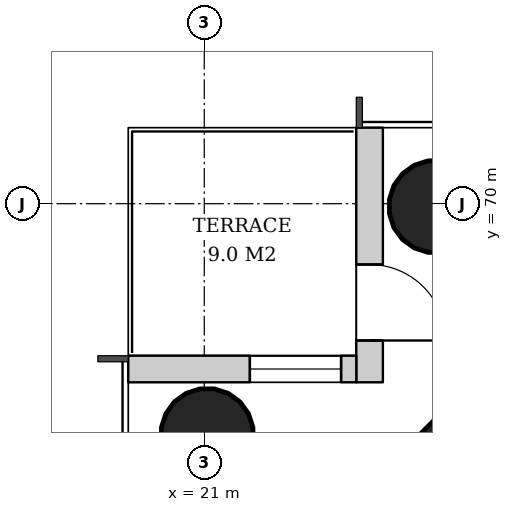
"""IFC4 building model, lengths in metres.
Left out: names, types, materials, properties, quantities, classifications, styles, units other than length and angle.
Written with IfcOpenShell. Run it as: python <this file> out.ifc"""

import sys

from ifc_helpers import new_model, si_unit, direction, frame, frame_2d, origin, origin_2d, place, context, subcontext, project, spatial, rectangle, hollow_circle, extrude, element, fill, save


model = new_model("IFC4")
c1 = context("Model", 3, precision=1e-05, world=origin(), true_north=direction((0.0, 1.0)))
c2 = subcontext(c1, "Body", "Model", "MODEL_VIEW")
j1 = project(units=[si_unit("LENGTHUNIT", "METRE"), si_unit("PLANEANGLEUNIT", "RADIAN")], contexts=[c1])
p1 = place(None, origin())
s1 = spatial("IfcSite", under=j1, at=p1, CompositionType="ELEMENT")
p2 = place(p1, origin())
s2 = spatial("IfcBuilding", under=s1, at=p2, CompositionType="ELEMENT")
p3 = place(p2, frame((0.0, 0.0, 21.0)))
s3 = spatial("IfcBuildingStorey", under=s2, at=p3, CompositionType="ELEMENT", Elevation=21.0)
p4 = place(p3, frame((25.103, 65.897, 0.078), z_axis=(0.031908173233, -0.031908173233, 0.998981349657), x_axis=(0.707106781187, 0.707106781187, 0.0)))
e1 = element("IfcColumn", 1, at=p4, inside=s3, PredefinedType="COLUMN", context=c2, shape_type="SweptSolid", body=[
    extrude(rectangle(XDim=3.4, YDim=3.4, at=origin_2d()), origin(), (0.0, 0.0, 1.0), 3.726),
])
for number, where, z_axis, x_axis in (
    (2, (24.001, 69.999, 0.04), (0.032, -0.032, 0.999), (0.707, 0.707, 0.0)),
    (3, (21.001, 66.999, 0.04), (0.032, -0.032, 0.999), (0.707, 0.707, 0.0)),
):
    element("IfcColumn", number, at=place(p3, frame(where, z_axis=z_axis, x_axis=x_axis)), inside=s3, PredefinedType="COLUMN", context=c2, shape_type="SweptSolid", body=[
        extrude(hollow_circle(Radius=0.61, WallThickness=0.04, at=origin_2d()), origin(), (0.0, 0.0, 1.0), 3.764),
    ])
p5 = place(p3, frame((23.175, 71.0, 0.0), z_axis=(0.0, 0.0, 1.0), x_axis=(0.0, -1.0, 0.0)))
e4 = element("IfcWall", 4, at=p5, inside=s3, PredefinedType="SOLIDWALL", context=c2, shape_type="SweptSolid", body=[
    extrude(rectangle(XDim=3.35, YDim=0.35, at=frame_2d((1.675, 0.0))), origin(), (0.0, 0.0, 1.0), 3.62),
])
p6 = place(p5, frame((1.8, 0.0, 0.0)))
e5 = element("IfcOpeningElement", 5, at=p6, cuts=e4, PredefinedType="OPENING", context=c2, shape_type="SweptSolid", body=[
    extrude(rectangle(XDim=1.0, YDim=2.4, at=frame_2d((0.5, 1.2))), frame((0.0, 0.185, 0.0), z_axis=(0.0, -1.0, 0.0), x_axis=(1.0, 0.0, 0.0)), (0.0, 0.0, 1.0), 0.37),
])
p7 = place(p3, frame((23.0, 67.825, 0.0), z_axis=(0.0, 0.0, 1.0), x_axis=(-1.0, 0.0, 0.0)))
e6 = element("IfcWall", 6, at=p7, inside=s3, PredefinedType="SOLIDWALL", context=c2, shape_type="SweptSolid", body=[
    extrude(rectangle(XDim=3.0, YDim=0.35, at=frame_2d((1.5, 0.0))), origin(), (0.0, 0.0, 1.0), 3.62),
])
p8 = place(p7, frame((0.2, 0.0, 0.6)))
e7 = element("IfcOpeningElement", 7, at=p8, cuts=e6, PredefinedType="OPENING", context=c2, shape_type="SweptSolid", body=[
    extrude(rectangle(XDim=1.2, YDim=2.55, at=frame_2d((0.6, 1.275))), frame((0.0, 0.185, 0.0), z_axis=(0.0, -1.0, 0.0), x_axis=(1.0, 0.0, 0.0)), (0.0, 0.0, 1.0), 0.37),
])
p9 = place(p6, origin())
e8 = element("IfcDoor", 8, at=p9, inside=s3, OperationType="SINGLE_SWING_RIGHT", PredefinedType="DOOR", context=c2, shape_type="SweptSolid", body=[
    extrude(rectangle(XDim=1.0, YDim=2.4, at=frame_2d((0.5, 1.2))), frame((0.0, 0.025, 0.0), z_axis=(0.0, -1.0, 0.0), x_axis=(1.0, 0.0, 0.0)), (0.0, 0.0, 1.0), 0.05),
])
fill(e5, e8)
p10 = place(p8, origin())
e9 = element("IfcWindow", 9, at=p10, inside=s3, PartitioningType="SINGLE_PANEL", PredefinedType="WINDOW", context=c2, shape_type="SweptSolid", body=[
    extrude(rectangle(XDim=1.2, YDim=2.55, at=frame_2d((0.6, 1.275))), frame((0.0, 0.03, 0.0), z_axis=(0.0, -1.0, 0.0), x_axis=(1.0, 0.0, 0.0)), (0.0, 0.0, 1.0), 0.06),
])
fill(e7, e9)
save(model, sys.argv[1])
